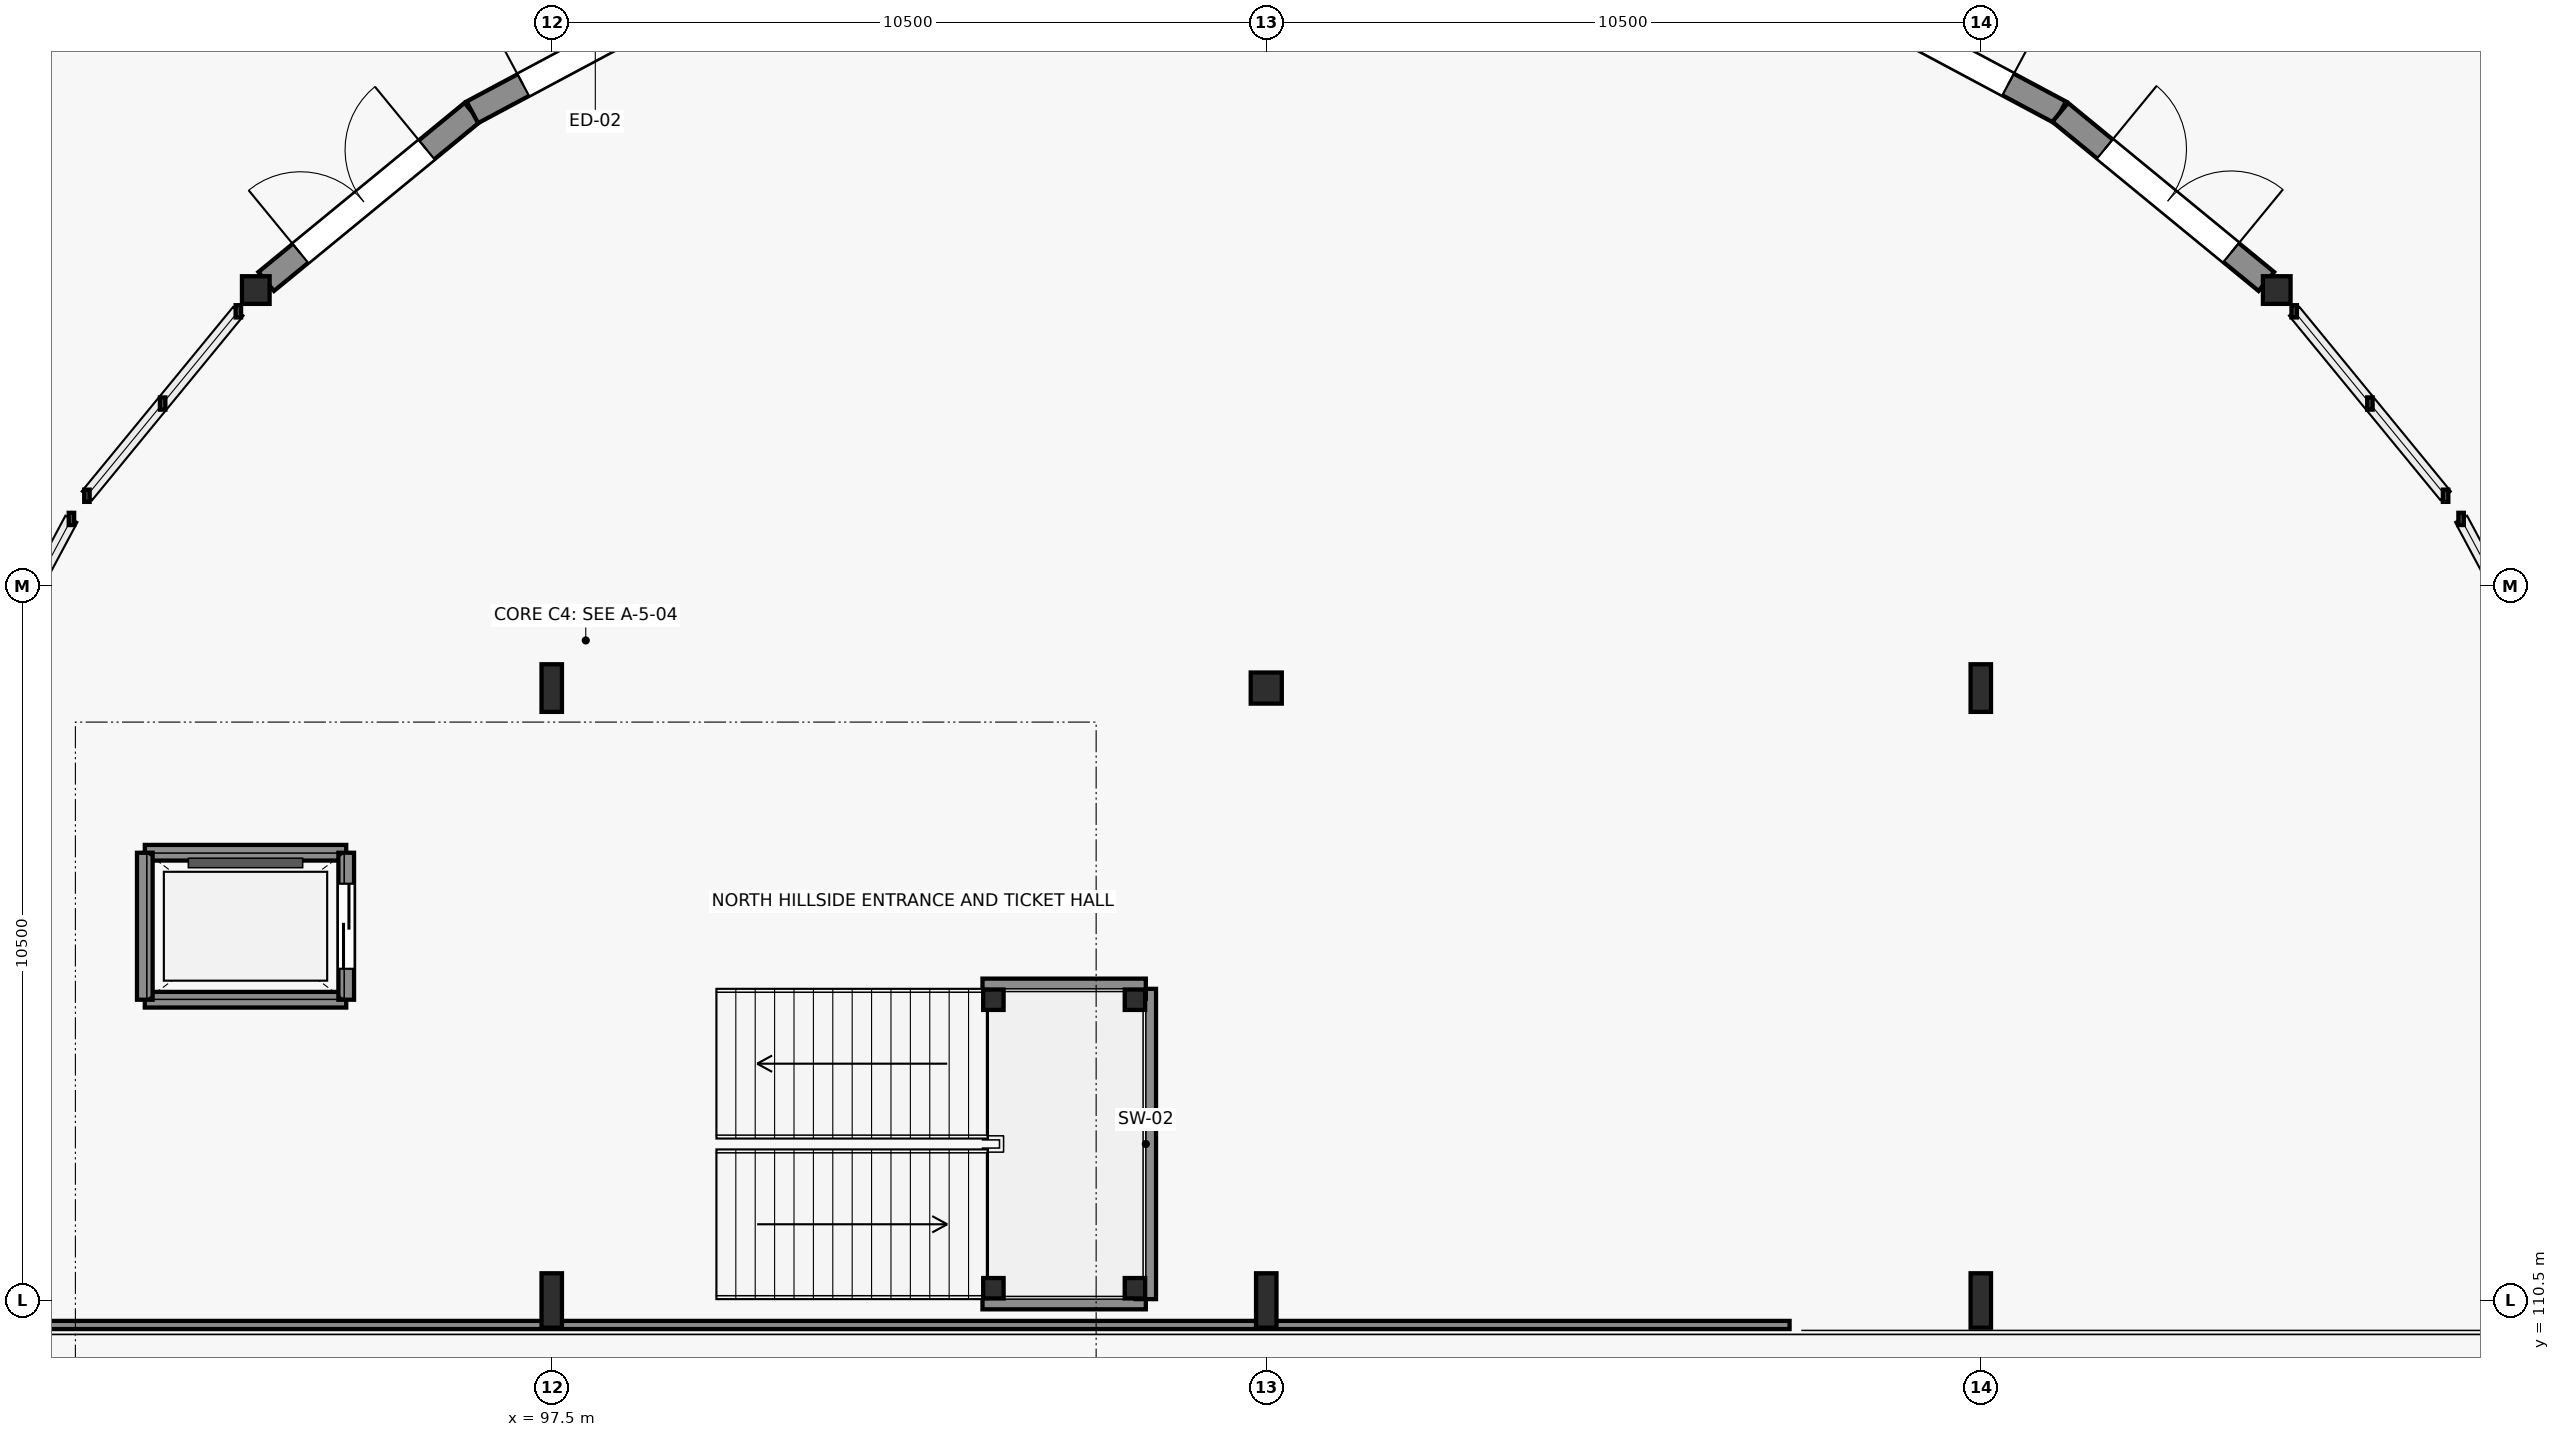
"""IFC4 building model, lengths in metres.
Left out: names, types, materials, properties, quantities, classifications, styles, units other than length and angle.
Written with IfcOpenShell. Run it as: python <this file> out.ifc"""

import sys

from ifc_helpers import new_model, si_unit, direction, frame, frame_2d, origin, origin_2d, place, context, subcontext, project, spatial, rectangle, hollow_rectangle, hollow_circle, i_section, extrude, element, fill, save


model = new_model("IFC4")
c1 = context("Model", 3, precision=1e-05, world=origin(), true_north=direction((0.0, 1.0)))
c2 = subcontext(c1, "Body", "Model", "MODEL_VIEW")
j1 = project(units=[si_unit("LENGTHUNIT", "METRE"), si_unit("PLANEANGLEUNIT", "RADIAN")], contexts=[c1])
p1 = place(None, origin())
s1 = spatial("IfcSite", under=j1, at=p1, CompositionType="ELEMENT")
p2 = place(p1, origin())
s2 = spatial("IfcBuilding", under=s1, at=p2, CompositionType="ELEMENT")
p3 = place(p2, frame((0.0, 0.0, 4.8)))
s3 = spatial("IfcBuildingStorey", under=s2, at=p3, CompositionType="ELEMENT", Elevation=4.8)
for number, where, z_axis, x_axis in (
    (1, (97.5, 110.5, 0.0), (0.0, 0.0, 1.0), (1.0, 0.0, 0.0)),
    (2, (108.0, 110.5, 0.0), (0.0, 0.0, 1.0), (1.0, 0.0, 0.0)),
    (3, (118.5, 110.5, 0.0), (0.0, 0.0, 1.0), (1.0, 0.0, 0.0)),
):
    element("IfcColumn", number, at=place(p3, frame(where, z_axis=z_axis, x_axis=x_axis)), inside=s3, PredefinedType="COLUMN", context=c2, shape_type="SweptSolid", body=[
        extrude(i_section(OverallWidth=0.3, OverallDepth=0.8, WebThickness=0.018, FlangeThickness=0.033, FilletRadius=0.03, at=origin_2d()), origin(), (0.0, 0.0, 1.0), 4.815),
    ])
for number, where, z_axis, x_axis in (
    (4, (93.151, 125.349, 0.0), (0.0, 0.0, 1.0), (1.0, 0.0, 0.0)),
    (5, (122.849, 125.349, 0.0), (0.0, 0.0, 1.0), (1.0, 0.0, 0.0)),
):
    element("IfcColumn", number, at=place(p3, frame(where, z_axis=z_axis, x_axis=x_axis)), inside=s3, PredefinedType="COLUMN", context=c2, shape_type="SweptSolid", body=[
        extrude(hollow_circle(Radius=0.203, WallThickness=0.02, at=origin_2d()), origin(), (0.0, 0.0, 1.0), 4.81),
    ])
p4 = place(p3, frame((97.5, 119.5, 0.0), z_axis=(0.0, 0.0, 1.0), x_axis=(1.0, 0.0, 0.0)))
e6 = element("IfcColumn", 6, at=p4, inside=s3, PredefinedType="COLUMN", context=c2, shape_type="SweptSolid", body=[
    extrude(i_section(OverallWidth=0.3, OverallDepth=0.7, WebThickness=0.017, FlangeThickness=0.032, FilletRadius=0.027, at=origin_2d()), origin(), (0.0, 0.0, 1.0), 4.815),
])
p5 = place(p3, frame((108.0, 119.5, 0.0), z_axis=(0.0, 0.0, 1.0), x_axis=(1.0, 0.0, 0.0)))
e7 = element("IfcColumn", 7, at=p5, inside=s3, PredefinedType="COLUMN", context=c2, shape_type="SweptSolid", body=[
    extrude(hollow_circle(Radius=0.229, WallThickness=0.02, at=origin_2d()), origin(), (0.0, 0.0, 1.0), 4.815),
])
p6 = place(p3, frame((118.5, 119.5, 0.0), z_axis=(0.0, 0.0, 1.0), x_axis=(1.0, 0.0, 0.0)))
e8 = element("IfcColumn", 8, at=p6, inside=s3, PredefinedType="COLUMN", context=c2, shape_type="SweptSolid", body=[
    extrude(i_section(OverallWidth=0.3, OverallDepth=0.7, WebThickness=0.017, FlangeThickness=0.032, FilletRadius=0.027, at=origin_2d()), origin(), (0.0, 0.0, 1.0), 4.815),
])
p7 = place(p3, frame((93.304, 125.475, 0.0), z_axis=(0.0, 0.0, 1.0), x_axis=(0.773015395656, 0.634387261914, 0.0)))
e9 = element("IfcWall", 9, at=p7, inside=s3, PredefinedType="SOLIDWALL", context=c2, shape_type="SweptSolid", body=[
    extrude(rectangle(XDim=3.918, YDim=0.36, at=frame_2d((1.959, 0.0))), origin(), (0.0, 0.0, 1.0), 4.3),
])
p8 = place(p7, frame((0.651, 0.0, 0.0)))
e10 = element("IfcOpeningElement", 10, at=p8, cuts=e9, PredefinedType="OPENING", context=c2, shape_type="SweptSolid", body=[
    extrude(rectangle(XDim=2.4, YDim=2.6, at=frame_2d((1.2, 1.3))), frame((0.0, 0.19, 0.0), z_axis=(0.0, -1.0, 0.0), x_axis=(1.0, 0.0, 0.0)), (0.0, 0.0, 1.0), 0.38),
])
p9 = place(p3, frame((96.333, 127.961, 0.0), z_axis=(0.0, 0.0, 1.0), x_axis=(0.881935241061, 0.471370587303, 0.0)))
e11 = element("IfcWall", 11, at=p9, inside=s3, PredefinedType="SOLIDWALL", context=c2, shape_type="SweptSolid", body=[
    extrude(rectangle(XDim=3.919, YDim=0.36, at=frame_2d((1.959, 0.0))), origin(), (0.0, 0.0, 1.0), 4.3),
])
p10 = place(p9, frame((0.849, 0.0, 0.0)))
e12 = element("IfcOpeningElement", 12, at=p10, cuts=e11, PredefinedType="OPENING", context=c2, shape_type="SweptSolid", body=[
    extrude(rectangle(XDim=2.4, YDim=2.6, at=frame_2d((1.2, 1.3))), frame((0.0, 0.19, 0.0), z_axis=(0.0, -1.0, 0.0), x_axis=(1.0, 0.0, 0.0)), (0.0, 0.0, 1.0), 0.38),
])
p11 = place(p3, frame((116.211, 129.808, 0.0), z_axis=(0.0, 0.0, 1.0), x_axis=(0.881935241061, -0.471370587303, 0.0)))
e13 = element("IfcWall", 13, at=p11, inside=s3, PredefinedType="SOLIDWALL", context=c2, shape_type="SweptSolid", body=[
    extrude(rectangle(XDim=3.919, YDim=0.36, at=frame_2d((1.959, 0.0))), origin(), (0.0, 0.0, 1.0), 4.3),
])
p12 = place(p11, frame((0.651, 0.0, 0.0)))
e14 = element("IfcOpeningElement", 14, at=p12, cuts=e13, PredefinedType="OPENING", context=c2, shape_type="SweptSolid", body=[
    extrude(rectangle(XDim=2.4, YDim=2.6, at=frame_2d((1.2, 1.3))), frame((0.0, 0.19, 0.0), z_axis=(0.0, -1.0, 0.0), x_axis=(1.0, 0.0, 0.0)), (0.0, 0.0, 1.0), 0.38),
])
p13 = place(p3, frame((119.667, 127.961, 0.0), z_axis=(0.0, 0.0, 1.0), x_axis=(0.773015395656, -0.634387261914, 0.0)))
e15 = element("IfcWall", 15, at=p13, inside=s3, PredefinedType="SOLIDWALL", context=c2, shape_type="SweptSolid", body=[
    extrude(rectangle(XDim=3.918, YDim=0.36, at=frame_2d((1.959, 0.0))), origin(), (0.0, 0.0, 1.0), 4.3),
])
p14 = place(p13, frame((0.849, 0.0, 0.0)))
e16 = element("IfcOpeningElement", 16, at=p14, cuts=e15, PredefinedType="OPENING", context=c2, shape_type="SweptSolid", body=[
    extrude(rectangle(XDim=2.4, YDim=2.6, at=frame_2d((1.2, 1.3))), frame((0.0, 0.19, 0.0), z_axis=(0.0, -1.0, 0.0), x_axis=(1.0, 0.0, 0.0)), (0.0, 0.0, 1.0), 0.38),
])
p15 = place(p3, frame((88.31, 110.14, 0.0), z_axis=(0.0, 0.0, 1.0), x_axis=(1.0, 0.0, 0.0)))
e17 = element("IfcWall", 17, at=p15, inside=s3, PredefinedType="PARTITIONING", context=c2, shape_type="SweptSolid", body=[
    extrude(rectangle(XDim=27.38, YDim=0.12, at=frame_2d((13.69, 0.0))), origin(), (0.0, 0.0, 1.0), 3.435),
])
for number, where, z_axis, x_axis in (
    (18, (91.52, 117.08, 0.0), (0.0, 0.0, 1.0), (1.0, 0.0, 0.0)),
    (19, (94.48, 114.92, 0.0), (0.0, 0.0, 1.0), (-1.0, 0.0, 0.0)),
):
    element("IfcWall", number, at=place(p3, frame(where, z_axis=z_axis, x_axis=x_axis)), inside=s3, PredefinedType="SOLIDWALL", context=c2, shape_type="SweptSolid", body=[
        extrude(rectangle(XDim=2.96, YDim=0.23, at=frame_2d((1.48, 0.0))), origin(), (0.0, 0.0, 1.0), 4.76),
    ])
p16 = place(p3, frame((91.52, 114.92, 0.0), z_axis=(0.0, 0.0, 1.0), x_axis=(0.0, 1.0, 0.0)))
e20 = element("IfcWall", 20, at=p16, inside=s3, PredefinedType="SOLIDWALL", context=c2, shape_type="SweptSolid", body=[
    extrude(rectangle(XDim=2.16, YDim=0.23, at=frame_2d((1.08, 0.0))), origin(), (0.0, 0.0, 1.0), 4.76),
])
p17 = place(p3, frame((94.48, 117.08, 0.0), z_axis=(0.0, 0.0, 1.0), x_axis=(0.0, -1.0, 0.0)))
e21 = element("IfcWall", 21, at=p17, inside=s3, PredefinedType="SOLIDWALL", context=c2, shape_type="SweptSolid", body=[
    extrude(rectangle(XDim=2.16, YDim=0.23, at=frame_2d((1.08, 0.0))), origin(), (0.0, 0.0, 1.0), 4.76),
])
p18 = place(p17, frame((0.455, 0.0, 0.0)))
e22 = element("IfcOpeningElement", 22, at=p18, cuts=e21, PredefinedType="OPENING", context=c2, shape_type="SweptSolid", body=[
    extrude(rectangle(XDim=1.25, YDim=2.2, at=frame_2d((0.625, 1.1))), frame((0.0, 0.125, 0.0), z_axis=(0.0, -1.0, 0.0), x_axis=(1.0, 0.0, 0.0)), (0.0, 0.0, 1.0), 0.25),
])
p19 = place(p3, frame((103.83, 110.52, 0.0), z_axis=(0.0, 0.0, 1.0), x_axis=(1.0, 0.0, 0.0)))
e23 = element("IfcWall", 23, at=p19, inside=s3, PredefinedType="SHEAR", context=c2, shape_type="SweptSolid", body=[
    extrude(rectangle(XDim=2.4, YDim=0.3, at=frame_2d((1.2, 0.0))), origin(), (0.0, 0.0, 1.0), 4.235),
])
p20 = place(p3, frame((106.23, 110.52, 0.0), z_axis=(0.0, 0.0, 1.0), x_axis=(0.0, 1.0, 0.0)))
e24 = element("IfcWall", 24, at=p20, inside=s3, PredefinedType="SHEAR", context=c2, shape_type="SweptSolid", body=[
    extrude(rectangle(XDim=4.56, YDim=0.3, at=frame_2d((2.28, 0.0))), origin(), (0.0, 0.0, 1.0), 4.235),
])
p21 = place(p3, frame((106.23, 115.08, 0.0), z_axis=(0.0, 0.0, 1.0), x_axis=(-1.0, 0.0, 0.0)))
e25 = element("IfcWall", 25, at=p21, inside=s3, PredefinedType="SHEAR", context=c2, shape_type="SweptSolid", body=[
    extrude(rectangle(XDim=2.4, YDim=0.3, at=frame_2d((1.2, 0.0))), origin(), (0.0, 0.0, 1.0), 4.75),
])
for number, where, z_axis, x_axis in (
    (26, (103.99, 110.68, 0.0), (0.0, 0.0, 1.0), (1.0, 0.0, 0.0)),
    (27, (106.07, 110.68, 0.0), (0.0, 0.0, 1.0), (1.0, 0.0, 0.0)),
    (28, (106.07, 114.92, 0.0), (0.0, 0.0, 1.0), (1.0, 0.0, 0.0)),
    (29, (103.99, 114.92, 0.0), (0.0, 0.0, 1.0), (1.0, 0.0, 0.0)),
):
    element("IfcColumn", number, at=place(p3, frame(where, z_axis=z_axis, x_axis=x_axis)), inside=s3, PredefinedType="COLUMN", context=c2, shape_type="SweptSolid", body=[
        extrude(hollow_rectangle(XDim=0.3, YDim=0.3, WallThickness=0.016, at=origin_2d()), origin(), (0.0, 0.0, 1.0), 2.18),
    ])
p22 = place(p8, origin())
e30 = element("IfcDoor", 30, at=p22, inside=s3, OperationType="DOUBLE_DOOR_SINGLE_SWING", PredefinedType="DOOR", context=c2, shape_type="SweptSolid", body=[
    extrude(rectangle(XDim=2.4, YDim=2.6, at=frame_2d((1.2, 1.3))), frame((0.0, 0.025, 0.0), z_axis=(0.0, -1.0, 0.0), x_axis=(1.0, 0.0, 0.0)), (0.0, 0.0, 1.0), 0.05),
])
fill(e10, e30)
p23 = place(p10, origin())
e31 = element("IfcDoor", 31, at=p23, inside=s3, OperationType="DOUBLE_DOOR_SINGLE_SWING", PredefinedType="DOOR", context=c2, shape_type="SweptSolid", body=[
    extrude(rectangle(XDim=2.4, YDim=2.6, at=frame_2d((1.2, 1.3))), frame((0.0, 0.025, 0.0), z_axis=(0.0, -1.0, 0.0), x_axis=(1.0, 0.0, 0.0)), (0.0, 0.0, 1.0), 0.05),
])
fill(e12, e31)
p24 = place(p12, origin())
e32 = element("IfcDoor", 32, at=p24, inside=s3, OperationType="DOUBLE_DOOR_SINGLE_SWING", PredefinedType="DOOR", context=c2, shape_type="SweptSolid", body=[
    extrude(rectangle(XDim=2.4, YDim=2.6, at=frame_2d((1.2, 1.3))), frame((0.0, 0.025, 0.0), z_axis=(0.0, -1.0, 0.0), x_axis=(1.0, 0.0, 0.0)), (0.0, 0.0, 1.0), 0.05),
])
fill(e14, e32)
p25 = place(p14, origin())
e33 = element("IfcDoor", 33, at=p25, inside=s3, OperationType="DOUBLE_DOOR_SINGLE_SWING", PredefinedType="DOOR", context=c2, shape_type="SweptSolid", body=[
    extrude(rectangle(XDim=2.4, YDim=2.6, at=frame_2d((1.2, 1.3))), frame((0.0, 0.025, 0.0), z_axis=(0.0, -1.0, 0.0), x_axis=(1.0, 0.0, 0.0)), (0.0, 0.0, 1.0), 0.05),
])
fill(e16, e33)
p26 = place(p18, origin())
e34 = element("IfcDoor", 34, at=p26, inside=s3, OperationType="DOUBLE_DOOR_SLIDING", PredefinedType="DOOR", context=c2, shape_type="SweptSolid", body=[
    extrude(rectangle(XDim=1.25, YDim=2.2, at=frame_2d((0.625, 1.1))), frame((0.0, 0.025, 0.0), z_axis=(0.0, -1.0, 0.0), x_axis=(1.0, 0.0, 0.0)), (0.0, 0.0, 1.0), 0.05),
])
fill(e22, e34)
save(model, sys.argv[1])
